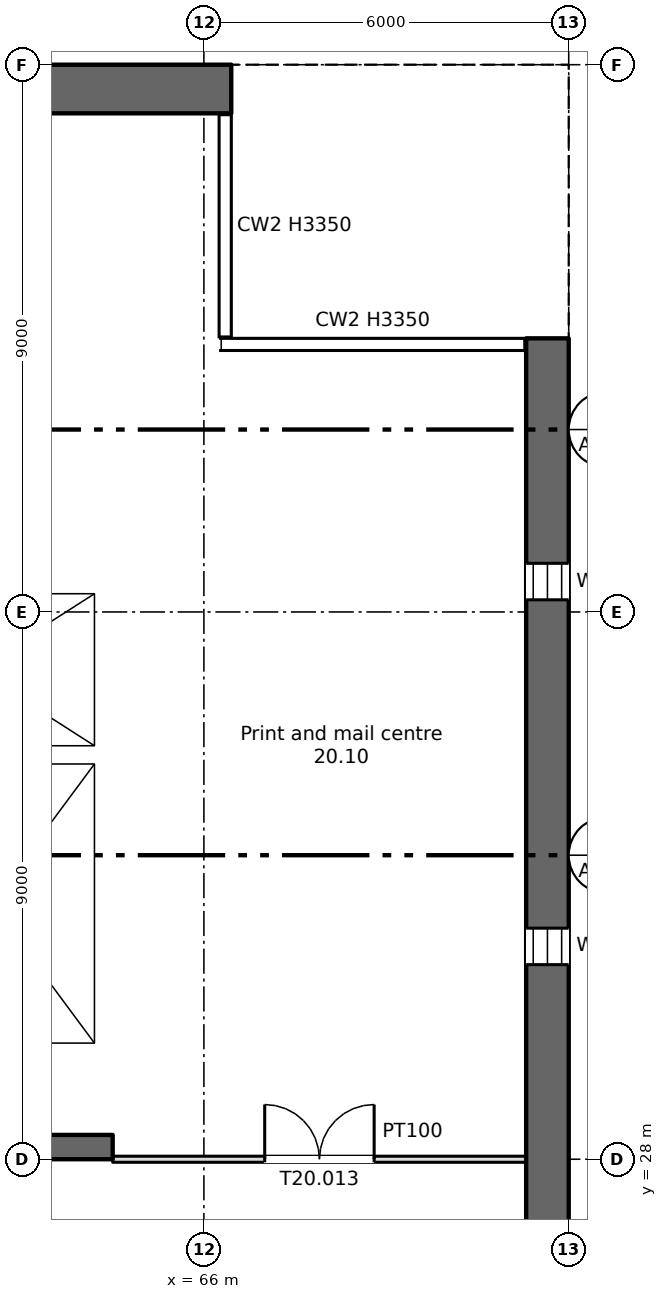
"""IFC4 building model, lengths in metres.
Left out: names, types, materials, properties, quantities, classifications, styles, units other than length and angle.
Written with IfcOpenShell. Run it as: python <this file> out.ifc"""

import sys

from ifc_helpers import new_model, si_unit, direction, frame, frame_2d, origin, place, context, subcontext, project, spatial, rectangle, extrude, element, fill, save


model = new_model("IFC4")
c1 = context("Model", 3, precision=1e-05, world=origin(), true_north=direction((0.0, 1.0)))
c2 = subcontext(c1, "Body", "Model", "MODEL_VIEW")
j1 = project(units=[si_unit("LENGTHUNIT", "METRE"), si_unit("PLANEANGLEUNIT", "RADIAN")], contexts=[c1])
p1 = place(None, origin())
s1 = spatial("IfcSite", under=j1, at=p1, CompositionType="ELEMENT")
p2 = place(p1, origin())
s2 = spatial("IfcBuilding", under=s1, at=p2, CompositionType="ELEMENT")
p3 = place(p2, frame((0.0, 0.0, 128.75)))
s3 = spatial("IfcBuildingStorey", under=s2, at=p3, CompositionType="ELEMENT", Elevation=128.75)
p4 = place(p3, frame((71.65, 6.0, 0.0), z_axis=(0.0, 0.0, 1.0), x_axis=(0.0, 1.0, 0.0)))
e1 = element("IfcWall", 1, at=p4, inside=s3, PredefinedType="SHEAR", context=c2, shape_type="SweptSolid", body=[
    extrude(rectangle(XDim=35.5, YDim=0.7, at=frame_2d((17.75, 0.0))), origin(), (0.0, 0.0, 1.0), 3.35),
])
p5 = place(p4, frame((1.6, 0.0, 0.6)))
e2 = element("IfcOpeningElement", 2, at=p5, cuts=e1, PredefinedType="OPENING", context=c2, shape_type="SweptSolid", body=[
    extrude(rectangle(XDim=0.6, YDim=2.4, at=frame_2d((0.3, 1.2))), frame((0.0, 0.36, 0.0), z_axis=(0.0, -1.0, 0.0), x_axis=(1.0, 0.0, 0.0)), (0.0, 0.0, 1.0), 0.72),
])
p6 = place(p4, frame((7.2, 0.0, 0.6)))
e3 = element("IfcOpeningElement", 3, at=p6, cuts=e1, PredefinedType="OPENING", context=c2, shape_type="SweptSolid", body=[
    extrude(rectangle(XDim=0.6, YDim=2.4, at=frame_2d((0.3, 1.2))), frame((0.0, 0.36, 0.0), z_axis=(0.0, -1.0, 0.0), x_axis=(1.0, 0.0, 0.0)), (0.0, 0.0, 1.0), 0.72),
])
p7 = place(p4, frame((13.2, 0.0, 0.6)))
e4 = element("IfcOpeningElement", 4, at=p7, cuts=e1, PredefinedType="OPENING", context=c2, shape_type="SweptSolid", body=[
    extrude(rectangle(XDim=0.6, YDim=2.4, at=frame_2d((0.3, 1.2))), frame((0.0, 0.36, 0.0), z_axis=(0.0, -1.0, 0.0), x_axis=(1.0, 0.0, 0.0)), (0.0, 0.0, 1.0), 0.72),
])
p8 = place(p4, frame((19.2, 0.0, 0.6)))
e5 = element("IfcOpeningElement", 5, at=p8, cuts=e1, PredefinedType="OPENING", context=c2, shape_type="SweptSolid", body=[
    extrude(rectangle(XDim=0.6, YDim=2.4, at=frame_2d((0.3, 1.2))), frame((0.0, 0.36, 0.0), z_axis=(0.0, -1.0, 0.0), x_axis=(1.0, 0.0, 0.0)), (0.0, 0.0, 1.0), 0.72),
])
p9 = place(p4, frame((25.2, 0.0, 0.6)))
e6 = element("IfcOpeningElement", 6, at=p9, cuts=e1, PredefinedType="OPENING", context=c2, shape_type="SweptSolid", body=[
    extrude(rectangle(XDim=0.6, YDim=2.4, at=frame_2d((0.3, 1.2))), frame((0.0, 0.36, 0.0), z_axis=(0.0, -1.0, 0.0), x_axis=(1.0, 0.0, 0.0)), (0.0, 0.0, 1.0), 0.72),
])
p10 = place(p4, frame((31.2, 0.0, 0.6)))
e7 = element("IfcOpeningElement", 7, at=p10, cuts=e1, PredefinedType="OPENING", context=c2, shape_type="SweptSolid", body=[
    extrude(rectangle(XDim=0.6, YDim=2.4, at=frame_2d((0.3, 1.2))), frame((0.0, 0.36, 0.0), z_axis=(0.0, -1.0, 0.0), x_axis=(1.0, 0.0, 0.0)), (0.0, 0.0, 1.0), 0.72),
])
p11 = place(p3, frame((5.55, 45.6, 0.0), z_axis=(0.0, 0.0, 1.0), x_axis=(1.0, 0.0, 0.0)))
e8 = element("IfcWall", 8, at=p11, inside=s3, PredefinedType="SHEAR", context=c2, shape_type="SweptSolid", body=[
    extrude(rectangle(XDim=60.9, YDim=0.8, at=frame_2d((30.45, 0.0))), origin(), (0.0, 0.0, 1.0), 3.35),
])
p12 = place(p11, frame((7.2, 0.0, 0.6)))
e9 = element("IfcOpeningElement", 9, at=p12, cuts=e8, PredefinedType="OPENING", context=c2, shape_type="SweptSolid", body=[
    extrude(rectangle(XDim=0.6, YDim=2.4, at=frame_2d((0.3, 1.2))), frame((0.0, 0.41, 0.0), z_axis=(0.0, -1.0, 0.0), x_axis=(1.0, 0.0, 0.0)), (0.0, 0.0, 1.0), 0.82),
])
p13 = place(p3, frame((6.7, 28.2, 0.0), z_axis=(0.0, 0.0, 1.0), x_axis=(1.0, 0.0, 0.0)))
e10 = element("IfcWall", 10, at=p13, inside=s3, PredefinedType="SHEAR", context=c2, shape_type="SweptSolid", body=[
    extrude(rectangle(XDim=57.8, YDim=0.4, at=frame_2d((28.9, 0.0))), origin(), (0.0, 0.0, 1.0), 3.35),
])
p14 = place(p13, frame((12.062, 0.0, 0.0)))
e11 = element("IfcOpeningElement", 11, at=p14, cuts=e10, PredefinedType="OPENING", context=c2, shape_type="SweptSolid", body=[
    extrude(rectangle(XDim=0.9, YDim=2.1, at=frame_2d((0.45, 1.05))), frame((0.0, 0.21, 0.0), z_axis=(0.0, -1.0, 0.0), x_axis=(1.0, 0.0, 0.0)), (0.0, 0.0, 1.0), 0.42),
])
p15 = place(p13, frame((14.637, 0.0, 0.0)))
e12 = element("IfcOpeningElement", 12, at=p15, cuts=e10, PredefinedType="OPENING", context=c2, shape_type="SweptSolid", body=[
    extrude(rectangle(XDim=0.9, YDim=2.1, at=frame_2d((0.45, 1.05))), frame((0.0, 0.21, 0.0), z_axis=(0.0, -1.0, 0.0), x_axis=(1.0, 0.0, 0.0)), (0.0, 0.0, 1.0), 0.42),
])
p16 = place(p13, frame((49.062, 0.0, 0.0)))
e13 = element("IfcOpeningElement", 13, at=p16, cuts=e10, PredefinedType="OPENING", context=c2, shape_type="SweptSolid", body=[
    extrude(rectangle(XDim=0.9, YDim=2.1, at=frame_2d((0.45, 1.05))), frame((0.0, 0.21, 0.0), z_axis=(0.0, -1.0, 0.0), x_axis=(1.0, 0.0, 0.0)), (0.0, 0.0, 1.0), 0.42),
])
p17 = place(p13, frame((51.637, 0.0, 0.0)))
e14 = element("IfcOpeningElement", 14, at=p17, cuts=e10, PredefinedType="OPENING", context=c2, shape_type="SweptSolid", body=[
    extrude(rectangle(XDim=0.9, YDim=2.1, at=frame_2d((0.45, 1.05))), frame((0.0, 0.21, 0.0), z_axis=(0.0, -1.0, 0.0), x_axis=(1.0, 0.0, 0.0)), (0.0, 0.0, 1.0), 0.42),
])
p18 = place(p13, frame((1.35, 0.0, 0.0)))
e15 = element("IfcOpeningElement", 15, at=p18, cuts=e10, PredefinedType="OPENING", context=c2, shape_type="SweptSolid", body=[
    extrude(rectangle(XDim=0.9, YDim=2.1, at=frame_2d((0.45, 1.05))), frame((0.0, 0.21, 0.0), z_axis=(0.0, -1.0, 0.0), x_axis=(1.0, 0.0, 0.0)), (0.0, 0.0, 1.0), 0.42),
])
p19 = place(p13, frame((4.7, 0.0, 0.0)))
e16 = element("IfcOpeningElement", 16, at=p19, cuts=e10, PredefinedType="OPENING", context=c2, shape_type="SweptSolid", body=[
    extrude(rectangle(XDim=1.2, YDim=2.1, at=frame_2d((0.6, 1.05))), frame((0.0, 0.21, 0.0), z_axis=(0.0, -1.0, 0.0), x_axis=(1.0, 0.0, 0.0)), (0.0, 0.0, 1.0), 0.42),
])
p20 = place(p13, frame((31.7, 0.0, 0.0)))
e17 = element("IfcOpeningElement", 17, at=p20, cuts=e10, PredefinedType="OPENING", context=c2, shape_type="SweptSolid", body=[
    extrude(rectangle(XDim=1.2, YDim=2.1, at=frame_2d((0.6, 1.05))), frame((0.0, 0.21, 0.0), z_axis=(0.0, -1.0, 0.0), x_axis=(1.0, 0.0, 0.0)), (0.0, 0.0, 1.0), 0.42),
])
p21 = place(p13, frame((55.2, 0.0, 0.0)))
e18 = element("IfcOpeningElement", 18, at=p21, cuts=e10, PredefinedType="OPENING", context=c2, shape_type="SweptSolid", body=[
    extrude(rectangle(XDim=1.2, YDim=2.1, at=frame_2d((0.6, 1.05))), frame((0.0, 0.21, 0.0), z_axis=(0.0, -1.0, 0.0), x_axis=(1.0, 0.0, 0.0)), (0.0, 0.0, 1.0), 0.42),
])
p22 = place(p13, frame((21.7, 0.0, 0.0)))
e19 = element("IfcOpeningElement", 19, at=p22, cuts=e10, PredefinedType="OPENING", context=c2, shape_type="SweptSolid", body=[
    extrude(rectangle(XDim=1.2, YDim=2.1, at=frame_2d((0.6, 1.05))), frame((0.0, 0.21, 0.0), z_axis=(0.0, -1.0, 0.0), x_axis=(1.0, 0.0, 0.0)), (0.0, 0.0, 1.0), 0.42),
])
p23 = place(p13, frame((41.7, 0.0, 0.0)))
e20 = element("IfcOpeningElement", 20, at=p23, cuts=e10, PredefinedType="OPENING", context=c2, shape_type="SweptSolid", body=[
    extrude(rectangle(XDim=1.2, YDim=2.1, at=frame_2d((0.6, 1.05))), frame((0.0, 0.21, 0.0), z_axis=(0.0, -1.0, 0.0), x_axis=(1.0, 0.0, 0.0)), (0.0, 0.0, 1.0), 0.42),
])
p24 = place(p13, frame((24.85, 0.0, 0.0)))
e21 = element("IfcOpeningElement", 21, at=p24, cuts=e10, PredefinedType="OPENING", context=c2, shape_type="SweptSolid", body=[
    extrude(rectangle(XDim=2.4, YDim=2.1, at=frame_2d((1.2, 1.05))), frame((0.0, 0.21, 0.0), z_axis=(0.0, -1.0, 0.0), x_axis=(1.0, 0.0, 0.0)), (0.0, 0.0, 1.0), 0.42),
])
p25 = place(p13, frame((37.35, 0.0, 0.0)))
e22 = element("IfcOpeningElement", 22, at=p25, cuts=e10, PredefinedType="OPENING", context=c2, shape_type="SweptSolid", body=[
    extrude(rectangle(XDim=2.4, YDim=2.1, at=frame_2d((1.2, 1.05))), frame((0.0, 0.21, 0.0), z_axis=(0.0, -1.0, 0.0), x_axis=(1.0, 0.0, 0.0)), (0.0, 0.0, 1.0), 0.42),
])
p26 = place(p13, frame((7.95, 0.0, 0.0)))
e23 = element("IfcOpeningElement", 23, at=p26, cuts=e10, PredefinedType="OPENING", context=c2, shape_type="SweptSolid", body=[
    extrude(rectangle(XDim=2.4, YDim=2.1, at=frame_2d((1.2, 1.05))), frame((0.0, 0.21, 0.0), z_axis=(0.0, -1.0, 0.0), x_axis=(1.0, 0.0, 0.0)), (0.0, 0.0, 1.0), 0.42),
])
p27 = place(p13, frame((28.85, 0.0, 0.0)))
e24 = element("IfcOpeningElement", 24, at=p27, cuts=e10, PredefinedType="OPENING", context=c2, shape_type="SweptSolid", body=[
    extrude(rectangle(XDim=0.9, YDim=2.1, at=frame_2d((0.45, 1.05))), frame((0.0, 0.21, 0.0), z_axis=(0.0, -1.0, 0.0), x_axis=(1.0, 0.0, 0.0)), (0.0, 0.0, 1.0), 0.42),
])
p28 = place(p13, frame((34.85, 0.0, 0.0)))
e25 = element("IfcOpeningElement", 25, at=p28, cuts=e10, PredefinedType="OPENING", context=c2, shape_type="SweptSolid", body=[
    extrude(rectangle(XDim=0.9, YDim=2.1, at=frame_2d((0.45, 1.05))), frame((0.0, 0.21, 0.0), z_axis=(0.0, -1.0, 0.0), x_axis=(1.0, 0.0, 0.0)), (0.0, 0.0, 1.0), 0.42),
])
p29 = place(p3, frame((64.35, 34.8, 0.0), z_axis=(0.0, 0.0, 1.0), x_axis=(0.0, 1.0, 0.0)))
e26 = element("IfcWall", 26, at=p29, inside=s3, PredefinedType="SHEAR", context=c2, shape_type="SweptSolid", body=[
    extrude(rectangle(XDim=10.4, YDim=0.3, at=frame_2d((5.2, 0.0))), origin(), (0.0, 0.0, 1.0), 3.35),
])
p30 = place(p3, frame((64.35, 28.4, 0.0), z_axis=(0.0, 0.0, 1.0), x_axis=(0.0, 1.0, 0.0)))
e27 = element("IfcWall", 27, at=p30, inside=s3, PredefinedType="SHEAR", context=c2, shape_type="SweptSolid", body=[
    extrude(rectangle(XDim=6.1, YDim=0.3, at=frame_2d((3.05, 0.0))), origin(), (0.0, 0.0, 1.0), 3.35),
])
p31 = place(p3, frame((60.3, 34.65, 0.0), z_axis=(0.0, 0.0, 1.0), x_axis=(1.0, 0.0, 0.0)))
e28 = element("IfcWall", 28, at=p31, inside=s3, PredefinedType="SHEAR", context=c2, shape_type="SweptSolid", body=[
    extrude(rectangle(XDim=4.2, YDim=0.3, at=frame_2d((2.1, 0.0))), origin(), (0.0, 0.0, 1.0), 3.35),
])
p32 = place(p3, frame((60.3, 37.45, 0.0), z_axis=(0.0, 0.0, 1.0), x_axis=(1.0, 0.0, 0.0)))
e29 = element("IfcWall", 29, at=p32, inside=s3, PredefinedType="SHEAR", context=c2, shape_type="SweptSolid", body=[
    extrude(rectangle(XDim=3.9, YDim=0.3, at=frame_2d((1.95, 0.0))), origin(), (0.0, 0.0, 1.0), 3.35),
])
p33 = place(p32, frame((1.4, 0.0, 0.0)))
e30 = element("IfcOpeningElement", 30, at=p33, cuts=e29, PredefinedType="OPENING", context=c2, shape_type="SweptSolid", body=[
    extrude(rectangle(XDim=1.1, YDim=2.1, at=frame_2d((0.55, 1.05))), frame((0.0, 0.16, 0.0), z_axis=(0.0, -1.0, 0.0), x_axis=(1.0, 0.0, 0.0)), (0.0, 0.0, 1.0), 0.32),
])
p34 = place(p3, frame((64.5, 28.0, 0.0), z_axis=(0.0, 0.0, 1.0), x_axis=(1.0, 0.0, 0.0)))
e31 = element("IfcWall", 31, at=p34, inside=s3, PredefinedType="PARTITIONING", context=c2, shape_type="SweptSolid", body=[
    extrude(rectangle(XDim=6.8, YDim=0.1, at=frame_2d((3.4, 0.0))), origin(), (0.0, 0.0, 1.0), 3.35),
])
p35 = place(p34, frame((2.5, 0.0, 0.0)))
e32 = element("IfcOpeningElement", 32, at=p35, cuts=e31, PredefinedType="OPENING", context=c2, shape_type="SweptSolid", body=[
    extrude(rectangle(XDim=1.8, YDim=2.1, at=frame_2d((0.9, 1.05))), frame((0.0, 0.06, 0.0), z_axis=(0.0, -1.0, 0.0), x_axis=(1.0, 0.0, 0.0)), (0.0, 0.0, 1.0), 0.12),
])
p36 = place(p9, origin())
e33 = element("IfcWindow", 33, at=p36, inside=s3, PartitioningType="SINGLE_PANEL", PredefinedType="WINDOW", context=c2, shape_type="SweptSolid", body=[
    extrude(rectangle(XDim=0.6, YDim=2.4, at=frame_2d((0.3, 1.2))), frame((0.0, 0.03, 0.0), z_axis=(0.0, -1.0, 0.0), x_axis=(1.0, 0.0, 0.0)), (0.0, 0.0, 1.0), 0.06),
])
fill(e6, e33)
p37 = place(p10, origin())
e34 = element("IfcWindow", 34, at=p37, inside=s3, PartitioningType="SINGLE_PANEL", PredefinedType="WINDOW", context=c2, shape_type="SweptSolid", body=[
    extrude(rectangle(XDim=0.6, YDim=2.4, at=frame_2d((0.3, 1.2))), frame((0.0, 0.03, 0.0), z_axis=(0.0, -1.0, 0.0), x_axis=(1.0, 0.0, 0.0)), (0.0, 0.0, 1.0), 0.06),
])
fill(e7, e34)
p38 = place(p35, origin())
e35 = element("IfcDoor", 35, at=p38, inside=s3, OperationType="DOUBLE_DOOR_SINGLE_SWING", PredefinedType="DOOR", context=c2, shape_type="SweptSolid", body=[
    extrude(rectangle(XDim=1.8, YDim=2.1, at=frame_2d((0.9, 1.05))), frame((0.0, 0.025, 0.0), z_axis=(0.0, -1.0, 0.0), x_axis=(1.0, 0.0, 0.0)), (0.0, 0.0, 1.0), 0.05),
])
fill(e32, e35)
save(model, sys.argv[1])
